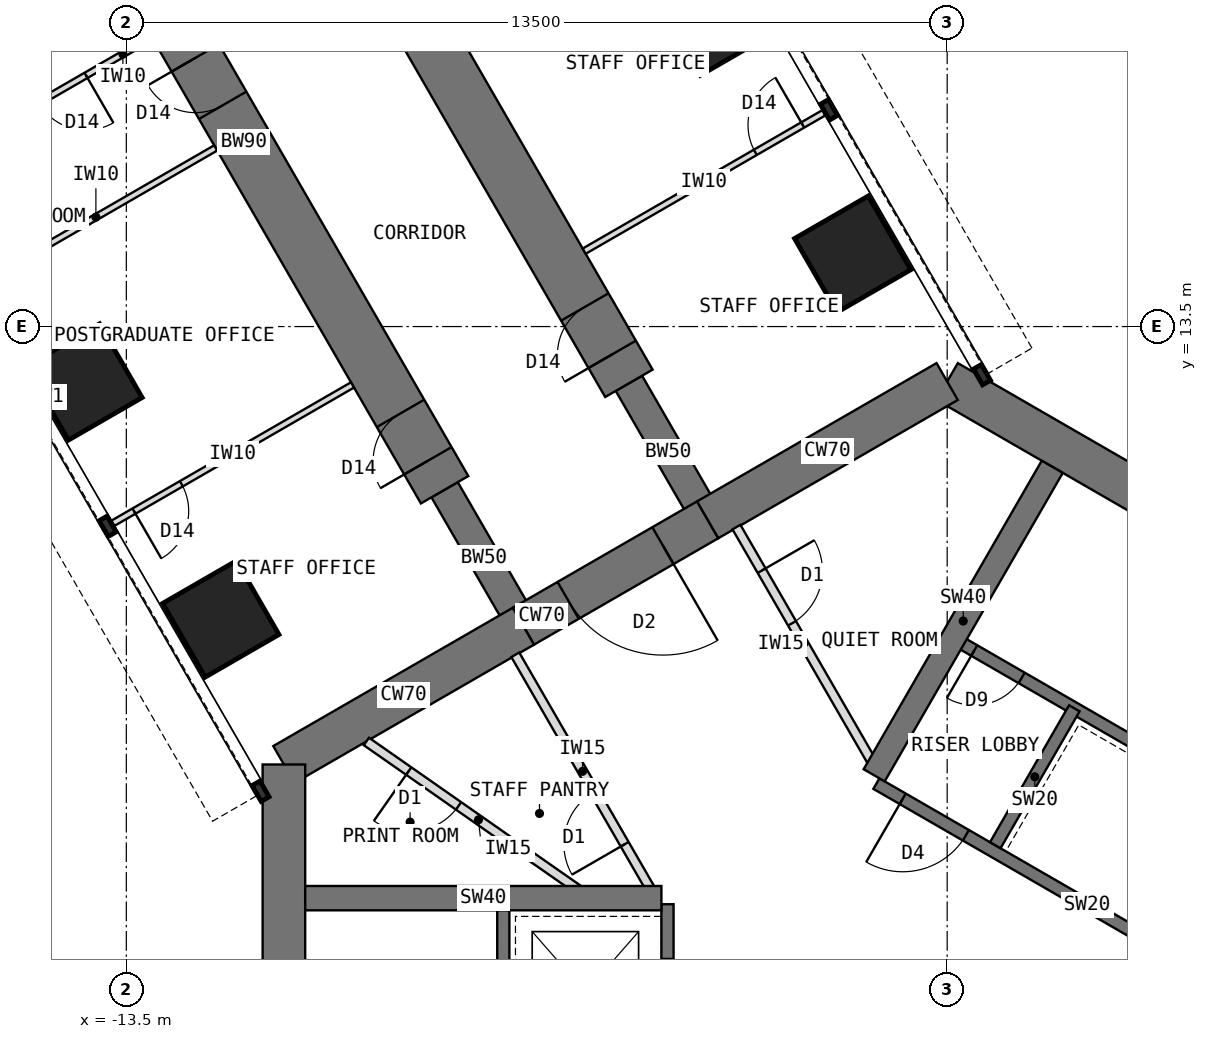
"""IFC4 building model, lengths in metres.
Left out: names, types, materials, properties, quantities, classifications, styles, units other than length and angle.
Written with IfcOpenShell. Run it as: python <this file> out.ifc"""

import sys

from ifc_helpers import new_model, si_unit, direction, frame, frame_2d, origin, origin_2d, place, context, subcontext, project, spatial, rectangle, extrude, element, fill, save


model = new_model("IFC4")
c1 = context("Model", 3, precision=1e-05, world=origin(), true_north=direction((0.0, 1.0)))
c2 = subcontext(c1, "Body", "Model", "MODEL_VIEW")
j1 = project(units=[si_unit("LENGTHUNIT", "METRE"), si_unit("PLANEANGLEUNIT", "RADIAN")], contexts=[c1])
p1 = place(None, origin())
s1 = spatial("IfcSite", under=j1, at=p1, CompositionType="ELEMENT")
p2 = place(p1, origin())
s2 = spatial("IfcBuilding", under=s1, at=p2, CompositionType="ELEMENT")
p3 = place(p2, frame((0.0, 0.0, 88.5)))
s3 = spatial("IfcBuildingStorey", under=s2, at=p3, CompositionType="ELEMENT", Elevation=88.5)
p4 = place(p3, frame((10.908, 6.298, 0.0), z_axis=(0.0, 0.0, 1.0), x_axis=(-0.866021940709, 0.500005998175, 0.0)))
e1 = element("IfcWall", 1, at=p4, inside=s3, PredefinedType="SHEAR", context=c2, shape_type="SweptSolid", body=[
    extrude(rectangle(XDim=12.596, YDim=0.7, at=frame_2d((6.298, 0.0))), origin(), (0.0, 0.0, 1.0), 4.0),
])
p5 = place(p3, frame((0.0, 12.596, 0.0), z_axis=(0.0, 0.0, 1.0), x_axis=(-0.866011268655, -0.500024481964, 0.0)))
e2 = element("IfcWall", 2, at=p5, inside=s3, PredefinedType="SHEAR", context=c2, shape_type="SweptSolid", body=[
    extrude(rectangle(XDim=4.548, YDim=0.7, at=frame_2d((2.274, 0.0))), origin(), (0.0, 0.0, 1.0), 4.0),
])
p6 = place(p3, frame((-3.939, 10.322, 0.0), z_axis=(0.0, 0.0, 1.0), x_axis=(-0.866019471182, -0.500010275428, 0.0)))
e3 = element("IfcWall", 3, at=p6, inside=s3, PredefinedType="SHEAR", context=c2, shape_type="SweptSolid", body=[
    extrude(rectangle(XDim=3.5, YDim=0.7, at=frame_2d((1.75, 0.0))), origin(), (0.0, 0.0, 1.0), 4.0),
])
p7 = place(p6, frame((0.85, 0.0, 0.0)))
e4 = element("IfcOpeningElement", 4, at=p7, cuts=e3, PredefinedType="OPENING", context=c2, shape_type="SweptSolid", body=[
    extrude(rectangle(XDim=1.8, YDim=2.1, at=frame_2d((0.9, 1.05))), frame((0.0, 0.36, 0.0), z_axis=(0.0, -1.0, 0.0), x_axis=(1.0, 0.0, 0.0)), (0.0, 0.0, 1.0), 0.72),
])
p8 = place(p3, frame((-6.97, 8.572, 0.0), z_axis=(0.0, 0.0, 1.0), x_axis=(-0.866034513004, -0.499984222037, 0.0)))
e5 = element("IfcWall", 5, at=p8, inside=s3, PredefinedType="SHEAR", context=c2, shape_type="SweptSolid", body=[
    extrude(rectangle(XDim=4.548, YDim=0.7, at=frame_2d((2.274, 0.0))), origin(), (0.0, 0.0, 1.0), 4.0),
])
p9 = place(p3, frame((-10.908, 6.298, 0.0), z_axis=(0.0, 0.0, 1.0), x_axis=(0.0, -1.0, 0.0)))
e6 = element("IfcWall", 6, at=p9, inside=s3, PredefinedType="SHEAR", context=c2, shape_type="SweptSolid", body=[
    extrude(rectangle(XDim=12.596, YDim=0.7, at=frame_2d((6.298, 0.0))), origin(), (0.0, 0.0, 1.0), 4.0),
])
p10 = place(p3, frame((-6.97, 8.572, 0.0), z_axis=(0.0, 0.0, 1.0), x_axis=(-0.499988811324, 0.866031863473, 0.0)))
e7 = element("IfcWall", 7, at=p10, inside=s3, PredefinedType="SHEAR", context=c2, shape_type="SweptSolid", body=[
    extrude(rectangle(XDim=2.592, YDim=0.5, at=frame_2d((1.296, 0.0))), origin(), (0.0, 0.0, 1.0), 4.0),
])
p11 = place(p3, frame((-8.266, 10.816, 0.0), z_axis=(0.0, 0.0, 1.0), x_axis=(-0.499996231654, 0.866027579429, 0.0)))
e8 = element("IfcWall", 8, at=p11, inside=s3, PredefinedType="SHEAR", context=c2, shape_type="SweptSolid", body=[
    extrude(rectangle(XDim=13.2, YDim=0.9, at=frame_2d((6.6, 0.0))), origin(), (0.0, 0.0, 1.0), 4.0),
])
p12 = place(p11, frame((0.55, 0.0, 0.0)))
e9 = element("IfcOpeningElement", 9, at=p12, cuts=e8, PredefinedType="OPENING", context=c2, shape_type="SweptSolid", body=[
    extrude(rectangle(XDim=0.9, YDim=2.1, at=frame_2d((0.45, 1.05))), frame((0.0, 0.46, 0.0), z_axis=(0.0, -1.0, 0.0), x_axis=(1.0, 0.0, 0.0)), (0.0, 0.0, 1.0), 0.92),
])
p13 = place(p11, frame((7.3, 0.0, 0.0)))
e10 = element("IfcOpeningElement", 10, at=p13, cuts=e8, PredefinedType="OPENING", context=c2, shape_type="SweptSolid", body=[
    extrude(rectangle(XDim=0.9, YDim=2.1, at=frame_2d((0.45, 1.05))), frame((0.0, 0.46, 0.0), z_axis=(0.0, -1.0, 0.0), x_axis=(1.0, 0.0, 0.0)), (0.0, 0.0, 1.0), 0.92),
])
p14 = place(p3, frame((-3.939, 10.322, 0.0), z_axis=(0.0, 0.0, 1.0), x_axis=(-0.499918158782, 0.866072649678, 0.0)))
e11 = element("IfcWall", 11, at=p14, inside=s3, PredefinedType="SHEAR", context=c2, shape_type="SweptSolid", body=[
    extrude(rectangle(XDim=2.592, YDim=0.5, at=frame_2d((1.296, 0.0))), origin(), (0.0, 0.0, 1.0), 4.0),
])
p15 = place(p3, frame((-5.234, 12.566, 0.0), z_axis=(0.0, 0.0, 1.0), x_axis=(-0.500010103361, 0.866019570528, 0.0)))
e12 = element("IfcWall", 12, at=p15, inside=s3, PredefinedType="SHEAR", context=c2, shape_type="SweptSolid", body=[
    extrude(rectangle(XDim=13.2, YDim=0.9, at=frame_2d((6.6, 0.0))), origin(), (0.0, 0.0, 1.0), 4.0),
])
p16 = place(p15, frame((0.55, 0.0, 0.0)))
e13 = element("IfcOpeningElement", 13, at=p16, cuts=e12, PredefinedType="OPENING", context=c2, shape_type="SweptSolid", body=[
    extrude(rectangle(XDim=0.9, YDim=2.1, at=frame_2d((0.45, 1.05))), frame((0.0, 0.46, 0.0), z_axis=(0.0, -1.0, 0.0), x_axis=(1.0, 0.0, 0.0)), (0.0, 0.0, 1.0), 0.92),
])
p17 = place(p15, frame((7.3, 0.0, 0.0)))
e14 = element("IfcOpeningElement", 14, at=p17, cuts=e12, PredefinedType="OPENING", context=c2, shape_type="SweptSolid", body=[
    extrude(rectangle(XDim=0.9, YDim=2.1, at=frame_2d((0.45, 1.05))), frame((0.0, 0.46, 0.0), z_axis=(0.0, -1.0, 0.0), x_axis=(1.0, 0.0, 0.0)), (0.0, 0.0, 1.0), 0.92),
])
for number, where, z_axis, x_axis in (
    (15, (-11.946, 8.691, 0.0), (0.0, 0.0, 1.0), (0.866, 0.5, 0.0)),
    (16, (-1.554, 14.691, 0.0), (0.0, 0.0, 1.0), (0.866, 0.5, 0.0)),
    (17, (-14.196, 12.588, 0.0), (0.0, 0.0, 1.0), (0.866, 0.5, 0.0)),
    (18, (-3.804, 18.588, 0.0), (0.0, 0.0, 1.0), (0.866, 0.5, 0.0)),
):
    element("IfcColumn", number, at=place(p3, frame(where, z_axis=z_axis, x_axis=x_axis)), inside=s3, PredefinedType="COLUMN", context=c2, shape_type="SweptSolid", body=[
        extrude(rectangle(XDim=1.4, YDim=1.4, at=origin_2d()), origin(), (0.0, 0.0, 1.0), 4.0),
    ])
p18 = place(p3, frame((5.764, 1.984, 0.0), z_axis=(0.0, 0.0, 1.0), x_axis=(-0.866026010844, 0.49999894854, 0.0)))
e19 = element("IfcWall", 19, at=p18, inside=s3, PredefinedType="SHEAR", context=c2, shape_type="SweptSolid", body=[
    extrude(rectangle(XDim=8.0, YDim=0.2, at=frame_2d((4.0, 0.0))), origin(), (0.0, 0.0, 1.0), 4.0),
])
p19 = place(p18, frame((6.3, 0.0, 0.0)))
e20 = element("IfcOpeningElement", 20, at=p19, cuts=e19, PredefinedType="OPENING", context=c2, shape_type="SweptSolid", body=[
    extrude(rectangle(XDim=1.2, YDim=2.1, at=frame_2d((0.6, 1.05))), frame((0.0, 0.11, 0.0), z_axis=(0.0, -1.0, 0.0), x_axis=(1.0, 0.0, 0.0)), (0.0, 0.0, 1.0), 0.22),
])
p20 = place(p3, frame((0.791, 4.97, 0.0), z_axis=(0.0, 0.0, 1.0), x_axis=(0.499936506574, 0.866062058628, 0.0)))
e21 = element("IfcWall", 21, at=p20, inside=s3, PredefinedType="SHEAR", context=c2, shape_type="SweptSolid", body=[
    extrude(rectangle(XDim=2.6, YDim=0.2, at=frame_2d((1.3, 0.0))), origin(), (0.0, 0.0, 1.0), 4.0),
])
p21 = place(p3, frame((7.114, 4.322, 0.0), z_axis=(0.0, 0.0, 1.0), x_axis=(-0.866026010844, 0.49999894854, 0.0)))
e22 = element("IfcWall", 22, at=p21, inside=s3, PredefinedType="SHEAR", context=c2, shape_type="SweptSolid", body=[
    extrude(rectangle(XDim=8.0, YDim=0.2, at=frame_2d((4.0, 0.0))), origin(), (0.0, 0.0, 1.0), 4.0),
])
p22 = place(p21, frame((6.8, 0.0, 0.0)))
e23 = element("IfcOpeningElement", 23, at=p22, cuts=e22, PredefinedType="OPENING", context=c2, shape_type="SweptSolid", body=[
    extrude(rectangle(XDim=0.9, YDim=2.1, at=frame_2d((0.45, 1.05))), frame((0.0, 0.11, 0.0), z_axis=(0.0, -1.0, 0.0), x_axis=(1.0, 0.0, 0.0)), (0.0, 0.0, 1.0), 0.22),
])
p23 = place(p3, frame((-1.201, 6.12, 0.0), z_axis=(0.0, 0.0, 1.0), x_axis=(0.500002627198, 0.866023886965, 0.0)))
e24 = element("IfcWall", 24, at=p23, inside=s3, PredefinedType="SHEAR", context=c2, shape_type="SweptSolid", body=[
    extrude(rectangle(XDim=5.858, YDim=0.4, at=frame_2d((2.929, 0.0))), origin(), (0.0, 0.0, 1.0), 4.0),
])
p24 = place(p3, frame((-4.6, 4.0, 0.0), z_axis=(0.0, 0.0, 1.0), x_axis=(0.0, -1.0, 0.0)))
e25 = element("IfcWall", 25, at=p24, inside=s3, PredefinedType="SHEAR", context=c2, shape_type="SweptSolid", body=[
    extrude(rectangle(XDim=8.0, YDim=0.2, at=frame_2d((4.0, 0.0))), origin(), (0.0, 0.0, 1.0), 4.0),
])
p25 = place(p24, frame((6.3, 0.0, 0.0)))
e26 = element("IfcOpeningElement", 26, at=p25, cuts=e25, PredefinedType="OPENING", context=c2, shape_type="SweptSolid", body=[
    extrude(rectangle(XDim=1.2, YDim=2.1, at=frame_2d((0.6, 1.05))), frame((0.0, 0.11, 0.0), z_axis=(0.0, -1.0, 0.0), x_axis=(1.0, 0.0, 0.0)), (0.0, 0.0, 1.0), 0.22),
])
p26 = place(p24, frame((0.9, 0.0, 0.0)))
e27 = element("IfcOpeningElement", 27, at=p26, cuts=e25, PredefinedType="OPENING", context=c2, shape_type="SweptSolid", body=[
    extrude(rectangle(XDim=1.1, YDim=2.2, at=frame_2d((0.55, 1.1))), frame((0.0, 0.11, 0.0), z_axis=(0.0, -1.0, 0.0), x_axis=(1.0, 0.0, 0.0)), (0.0, 0.0, 1.0), 0.22),
])
p27 = place(p3, frame((-7.3, 4.0, 0.0), z_axis=(0.0, 0.0, 1.0), x_axis=(0.0, -1.0, 0.0)))
e28 = element("IfcWall", 28, at=p27, inside=s3, PredefinedType="SHEAR", context=c2, shape_type="SweptSolid", body=[
    extrude(rectangle(XDim=8.0, YDim=0.2, at=frame_2d((4.0, 0.0))), origin(), (0.0, 0.0, 1.0), 4.0),
])
p28 = place(p27, frame((6.7, 0.0, 0.0)))
e29 = element("IfcOpeningElement", 29, at=p28, cuts=e28, PredefinedType="OPENING", context=c2, shape_type="SweptSolid", body=[
    extrude(rectangle(XDim=1.1, YDim=2.1, at=frame_2d((0.55, 1.05))), frame((0.0, 0.11, 0.0), z_axis=(0.0, -1.0, 0.0), x_axis=(1.0, 0.0, 0.0)), (0.0, 0.0, 1.0), 0.22),
])
p29 = place(p3, frame((-4.7, 4.1, 0.0), z_axis=(0.0, 0.0, 1.0), x_axis=(-1.0, 0.0, 0.0)))
e30 = element("IfcWall", 30, at=p29, inside=s3, PredefinedType="SHEAR", context=c2, shape_type="SweptSolid", body=[
    extrude(rectangle(XDim=5.858, YDim=0.4, at=frame_2d((2.929, 0.0))), origin(), (0.0, 0.0, 1.0), 4.0),
])
p30 = place(p3, frame((-9.78, 12.54, 0.0), z_axis=(0.0, 0.0, 1.0), x_axis=(-0.866035472144, -0.499982560684, 0.0)))
e31 = element("IfcWall", 31, at=p30, inside=s3, PredefinedType="PARTITIONING", context=c2, shape_type="SweptSolid", body=[
    extrude(rectangle(XDim=4.55, YDim=0.1, at=frame_2d((2.275, 0.0))), origin(), (0.0, 0.0, 1.0), 3.7),
])
p31 = place(p30, frame((3.25, 0.0, 0.0)))
e32 = element("IfcOpeningElement", 32, at=p31, cuts=e31, PredefinedType="OPENING", context=c2, shape_type="SweptSolid", body=[
    extrude(rectangle(XDim=0.9, YDim=2.1, at=frame_2d((0.45, 1.05))), frame((0.0, 0.06, 0.0), z_axis=(0.0, -1.0, 0.0), x_axis=(1.0, 0.0, 0.0)), (0.0, 0.0, 1.0), 0.12),
])
p32 = place(p3, frame((-12.03, 16.437, 0.0), z_axis=(0.0, 0.0, 1.0), x_axis=(-0.866035472144, -0.499982560684, 0.0)))
e33 = element("IfcWall", 33, at=p32, inside=s3, PredefinedType="PARTITIONING", context=c2, shape_type="SweptSolid", body=[
    extrude(rectangle(XDim=4.55, YDim=0.1, at=frame_2d((2.275, 0.0))), origin(), (0.0, 0.0, 1.0), 3.7),
])
p33 = place(p3, frame((-13.08, 18.256, 0.0), z_axis=(0.0, 0.0, 1.0), x_axis=(-0.866020560687, -0.500008388397, 0.0)))
e34 = element("IfcWall", 34, at=p33, inside=s3, PredefinedType="PARTITIONING", context=c2, shape_type="SweptSolid", body=[
    extrude(rectangle(XDim=3.4, YDim=0.1, at=frame_2d((1.7, 0.0))), origin(), (0.0, 0.0, 1.0), 3.7),
])
p34 = place(p33, frame((1.25, 0.0, 0.0)))
e35 = element("IfcOpeningElement", 35, at=p34, cuts=e34, PredefinedType="OPENING", context=c2, shape_type="SweptSolid", body=[
    extrude(rectangle(XDim=0.9, YDim=2.1, at=frame_2d((0.45, 1.05))), frame((0.0, 0.06, 0.0), z_axis=(0.0, -1.0, 0.0), x_axis=(1.0, 0.0, 0.0)), (0.0, 0.0, 1.0), 0.12),
])
p35 = place(p3, frame((-5.97, 14.74, 0.0), z_axis=(0.0, 0.0, 1.0), x_axis=(0.866035472144, 0.499982560684, 0.0)))
e36 = element("IfcWall", 36, at=p35, inside=s3, PredefinedType="PARTITIONING", context=c2, shape_type="SweptSolid", body=[
    extrude(rectangle(XDim=4.55, YDim=0.1, at=frame_2d((2.275, 0.0))), origin(), (0.0, 0.0, 1.0), 3.7),
])
p36 = place(p35, frame((3.25, 0.0, 0.0)))
e37 = element("IfcOpeningElement", 37, at=p36, cuts=e36, PredefinedType="OPENING", context=c2, shape_type="SweptSolid", body=[
    extrude(rectangle(XDim=0.9, YDim=2.1, at=frame_2d((0.45, 1.05))), frame((0.0, 0.06, 0.0), z_axis=(0.0, -1.0, 0.0), x_axis=(1.0, 0.0, 0.0)), (0.0, 0.0, 1.0), 0.12),
])
p37 = place(p3, frame((-4.89, 4.27, 0.0), z_axis=(0.0, 0.0, 1.0), x_axis=(-0.500007369519, 0.866021148949, 0.0)))
e38 = element("IfcWall", 38, at=p37, inside=s3, PredefinedType="PARTITIONING", context=c2, shape_type="SweptSolid", body=[
    extrude(rectangle(XDim=4.426, YDim=0.15, at=frame_2d((2.213, 0.0))), origin(), (0.0, 0.0, 1.0), 3.7),
])
p38 = place(p37, frame((0.828, 0.0, 0.0)))
e39 = element("IfcOpeningElement", 39, at=p38, cuts=e38, PredefinedType="OPENING", context=c2, shape_type="SweptSolid", body=[
    extrude(rectangle(XDim=1.0, YDim=2.1, at=frame_2d((0.5, 1.05))), frame((0.0, 0.085, 0.0), z_axis=(0.0, -1.0, 0.0), x_axis=(1.0, 0.0, 0.0)), (0.0, 0.0, 1.0), 0.17),
])
p39 = place(p3, frame((-3.466, 10.202, 0.0), z_axis=(0.0, 0.0, 1.0), x_axis=(0.500007369519, -0.866021148949, 0.0)))
e40 = element("IfcWall", 40, at=p39, inside=s3, PredefinedType="PARTITIONING", context=c2, shape_type="SweptSolid", body=[
    extrude(rectangle(XDim=4.426, YDim=0.15, at=frame_2d((2.213, 0.0))), origin(), (0.0, 0.0, 1.0), 3.7),
])
p40 = place(p39, frame((0.828, 0.0, 0.0)))
e41 = element("IfcOpeningElement", 41, at=p40, cuts=e40, PredefinedType="OPENING", context=c2, shape_type="SweptSolid", body=[
    extrude(rectangle(XDim=1.0, YDim=2.1, at=frame_2d((0.5, 1.05))), frame((0.0, 0.085, 0.0), z_axis=(0.0, -1.0, 0.0), x_axis=(1.0, 0.0, 0.0)), (0.0, 0.0, 1.0), 0.17),
])
p41 = place(p3, frame((-5.865, 4.1, 0.0), z_axis=(0.0, 0.0, 1.0), x_axis=(-0.819614241928, 0.572915783016, 0.0)))
e42 = element("IfcWall", 42, at=p41, inside=s3, PredefinedType="PARTITIONING", context=c2, shape_type="SweptSolid", body=[
    extrude(rectangle(XDim=4.498, YDim=0.15, at=frame_2d((2.249, 0.0))), origin(), (0.0, 0.0, 1.0), 3.7),
])
p42 = place(p41, frame((2.648, 0.0, 0.0)))
e43 = element("IfcOpeningElement", 43, at=p42, cuts=e42, PredefinedType="OPENING", context=c2, shape_type="SweptSolid", body=[
    extrude(rectangle(XDim=1.0, YDim=2.1, at=frame_2d((0.5, 1.05))), frame((0.0, 0.085, 0.0), z_axis=(0.0, -1.0, 0.0), x_axis=(1.0, 0.0, 0.0)), (0.0, 0.0, 1.0), 0.17),
])
p43 = place(p19, origin())
e44 = element("IfcDoor", 44, at=p43, inside=s3, OperationType="SINGLE_SWING_RIGHT", PredefinedType="DOOR", context=c2, shape_type="SweptSolid", body=[
    extrude(rectangle(XDim=1.2, YDim=2.1, at=frame_2d((0.6, 1.05))), frame((0.0, 0.025, 0.0), z_axis=(0.0, -1.0, 0.0), x_axis=(1.0, 0.0, 0.0)), (0.0, 0.0, 1.0), 0.05),
])
fill(e20, e44)
p44 = place(p22, origin())
e45 = element("IfcDoor", 45, at=p44, inside=s3, OperationType="SINGLE_SWING_RIGHT", PredefinedType="DOOR", context=c2, shape_type="SweptSolid", body=[
    extrude(rectangle(XDim=0.9, YDim=2.1, at=frame_2d((0.45, 1.05))), frame((0.0, 0.025, 0.0), z_axis=(0.0, -1.0, 0.0), x_axis=(1.0, 0.0, 0.0)), (0.0, 0.0, 1.0), 0.05),
])
fill(e23, e45)
p45 = place(p7, origin())
e46 = element("IfcDoor", 46, at=p45, inside=s3, OperationType="DOUBLE_DOOR_DOUBLE_SWING", PredefinedType="DOOR", context=c2, shape_type="SweptSolid", body=[
    extrude(rectangle(XDim=1.72, YDim=2.06, at=frame_2d((0.9, 1.03))), frame((0.0, 0.025, 0.0), z_axis=(0.0, -1.0, 0.0), x_axis=(1.0, 0.0, 0.0)), (0.0, 0.0, 1.0), 0.05),
    extrude(rectangle(XDim=0.04, YDim=2.1, at=frame_2d((0.02, 1.05))), frame((0.0, 0.35, 0.0), z_axis=(0.0, -1.0, 0.0), x_axis=(1.0, 0.0, 0.0)), (0.0, 0.0, 1.0), 0.699),
    extrude(rectangle(XDim=0.04, YDim=2.1, at=frame_2d((1.78, 1.05))), frame((0.0, 0.35, 0.0), z_axis=(0.0, -1.0, 0.0), x_axis=(1.0, 0.0, 0.0)), (0.0, 0.0, 1.0), 0.699),
    extrude(rectangle(XDim=1.72, YDim=0.04, at=frame_2d((0.9, 2.08))), frame((0.0, 0.35, 0.0), z_axis=(0.0, -1.0, 0.0), x_axis=(1.0, 0.0, 0.0)), (0.0, 0.0, 1.0), 0.699),
])
fill(e4, e46)
p46 = place(p31, origin())
e47 = element("IfcDoor", 47, at=p46, inside=s3, OperationType="SINGLE_SWING_RIGHT", PredefinedType="DOOR", context=c2, shape_type="SweptSolid", body=[
    extrude(rectangle(XDim=0.9, YDim=2.1, at=frame_2d((0.45, 1.05))), frame((0.0, 0.025, 0.0), z_axis=(0.0, -1.0, 0.0), x_axis=(1.0, 0.0, 0.0)), (0.0, 0.0, 1.0), 0.05),
])
fill(e32, e47)
p47 = place(p34, origin())
e48 = element("IfcDoor", 48, at=p47, inside=s3, OperationType="SINGLE_SWING_LEFT", PredefinedType="DOOR", context=c2, shape_type="SweptSolid", body=[
    extrude(rectangle(XDim=0.9, YDim=2.1, at=frame_2d((0.45, 1.05))), frame((0.0, 0.025, 0.0), z_axis=(0.0, -1.0, 0.0), x_axis=(1.0, 0.0, 0.0)), (0.0, 0.0, 1.0), 0.05),
])
fill(e35, e48)
p48 = place(p36, origin())
e49 = element("IfcDoor", 49, at=p48, inside=s3, OperationType="SINGLE_SWING_RIGHT", PredefinedType="DOOR", context=c2, shape_type="SweptSolid", body=[
    extrude(rectangle(XDim=0.9, YDim=2.1, at=frame_2d((0.45, 1.05))), frame((0.0, 0.025, 0.0), z_axis=(0.0, -1.0, 0.0), x_axis=(1.0, 0.0, 0.0)), (0.0, 0.0, 1.0), 0.05),
])
fill(e37, e49)
p49 = place(p40, origin())
e50 = element("IfcDoor", 50, at=p49, inside=s3, OperationType="SINGLE_SWING_LEFT", PredefinedType="DOOR", context=c2, shape_type="SweptSolid", body=[
    extrude(rectangle(XDim=1.0, YDim=2.1, at=frame_2d((0.5, 1.05))), frame((0.0, 0.025, 0.0), z_axis=(0.0, -1.0, 0.0), x_axis=(1.0, 0.0, 0.0)), (0.0, 0.0, 1.0), 0.05),
])
fill(e41, e50)
p50 = place(p42, origin())
e51 = element("IfcDoor", 51, at=p50, inside=s3, OperationType="SINGLE_SWING_RIGHT", PredefinedType="DOOR", context=c2, shape_type="SweptSolid", body=[
    extrude(rectangle(XDim=1.0, YDim=2.1, at=frame_2d((0.5, 1.05))), frame((0.0, 0.025, 0.0), z_axis=(0.0, -1.0, 0.0), x_axis=(1.0, 0.0, 0.0)), (0.0, 0.0, 1.0), 0.05),
])
fill(e43, e51)
p51 = place(p38, origin())
e52 = element("IfcDoor", 52, at=p51, inside=s3, OperationType="SINGLE_SWING_LEFT", PredefinedType="DOOR", context=c2, shape_type="SweptSolid", body=[
    extrude(rectangle(XDim=1.0, YDim=2.1, at=frame_2d((0.5, 1.05))), frame((0.0, 0.025, 0.0), z_axis=(0.0, -1.0, 0.0), x_axis=(1.0, 0.0, 0.0)), (0.0, 0.0, 1.0), 0.05),
])
fill(e39, e52)
p52 = place(p12, origin())
e53 = element("IfcDoor", 53, at=p52, inside=s3, OperationType="SINGLE_SWING_LEFT", PredefinedType="DOOR", context=c2, shape_type="SweptSolid", body=[
    extrude(rectangle(XDim=0.82, YDim=2.06, at=frame_2d((0.45, 1.03))), frame((0.0, 0.025, 0.0), z_axis=(0.0, -1.0, 0.0), x_axis=(1.0, 0.0, 0.0)), (0.0, 0.0, 1.0), 0.05),
    extrude(rectangle(XDim=0.04, YDim=2.1, at=frame_2d((0.02, 1.05))), frame((0.0, 0.45, 0.0), z_axis=(0.0, -1.0, 0.0), x_axis=(1.0, 0.0, 0.0)), (0.0, 0.0, 1.0), 0.899),
    extrude(rectangle(XDim=0.04, YDim=2.1, at=frame_2d((0.88, 1.05))), frame((0.0, 0.45, 0.0), z_axis=(0.0, -1.0, 0.0), x_axis=(1.0, 0.0, 0.0)), (0.0, 0.0, 1.0), 0.899),
    extrude(rectangle(XDim=0.82, YDim=0.04, at=frame_2d((0.45, 2.08))), frame((0.0, 0.45, 0.0), z_axis=(0.0, -1.0, 0.0), x_axis=(1.0, 0.0, 0.0)), (0.0, 0.0, 1.0), 0.899),
])
fill(e9, e53)
p53 = place(p13, origin())
e54 = element("IfcDoor", 54, at=p53, inside=s3, OperationType="SINGLE_SWING_RIGHT", PredefinedType="DOOR", context=c2, shape_type="SweptSolid", body=[
    extrude(rectangle(XDim=0.82, YDim=2.06, at=frame_2d((0.45, 1.03))), frame((0.0, 0.025, 0.0), z_axis=(0.0, -1.0, 0.0), x_axis=(1.0, 0.0, 0.0)), (0.0, 0.0, 1.0), 0.05),
    extrude(rectangle(XDim=0.04, YDim=2.1, at=frame_2d((0.02, 1.05))), frame((0.0, 0.45, 0.0), z_axis=(0.0, -1.0, 0.0), x_axis=(1.0, 0.0, 0.0)), (0.0, 0.0, 1.0), 0.899),
    extrude(rectangle(XDim=0.04, YDim=2.1, at=frame_2d((0.88, 1.05))), frame((0.0, 0.45, 0.0), z_axis=(0.0, -1.0, 0.0), x_axis=(1.0, 0.0, 0.0)), (0.0, 0.0, 1.0), 0.899),
    extrude(rectangle(XDim=0.82, YDim=0.04, at=frame_2d((0.45, 2.08))), frame((0.0, 0.45, 0.0), z_axis=(0.0, -1.0, 0.0), x_axis=(1.0, 0.0, 0.0)), (0.0, 0.0, 1.0), 0.899),
])
fill(e10, e54)
p54 = place(p16, origin())
e55 = element("IfcDoor", 55, at=p54, inside=s3, OperationType="SINGLE_SWING_LEFT", PredefinedType="DOOR", context=c2, shape_type="SweptSolid", body=[
    extrude(rectangle(XDim=0.82, YDim=2.06, at=frame_2d((0.45, 1.03))), frame((0.0, 0.025, 0.0), z_axis=(0.0, -1.0, 0.0), x_axis=(1.0, 0.0, 0.0)), (0.0, 0.0, 1.0), 0.05),
    extrude(rectangle(XDim=0.04, YDim=2.1, at=frame_2d((0.02, 1.05))), frame((0.0, 0.45, 0.0), z_axis=(0.0, -1.0, 0.0), x_axis=(1.0, 0.0, 0.0)), (0.0, 0.0, 1.0), 0.899),
    extrude(rectangle(XDim=0.04, YDim=2.1, at=frame_2d((0.88, 1.05))), frame((0.0, 0.45, 0.0), z_axis=(0.0, -1.0, 0.0), x_axis=(1.0, 0.0, 0.0)), (0.0, 0.0, 1.0), 0.899),
    extrude(rectangle(XDim=0.82, YDim=0.04, at=frame_2d((0.45, 2.08))), frame((0.0, 0.45, 0.0), z_axis=(0.0, -1.0, 0.0), x_axis=(1.0, 0.0, 0.0)), (0.0, 0.0, 1.0), 0.899),
])
fill(e13, e55)
save(model, sys.argv[1])
